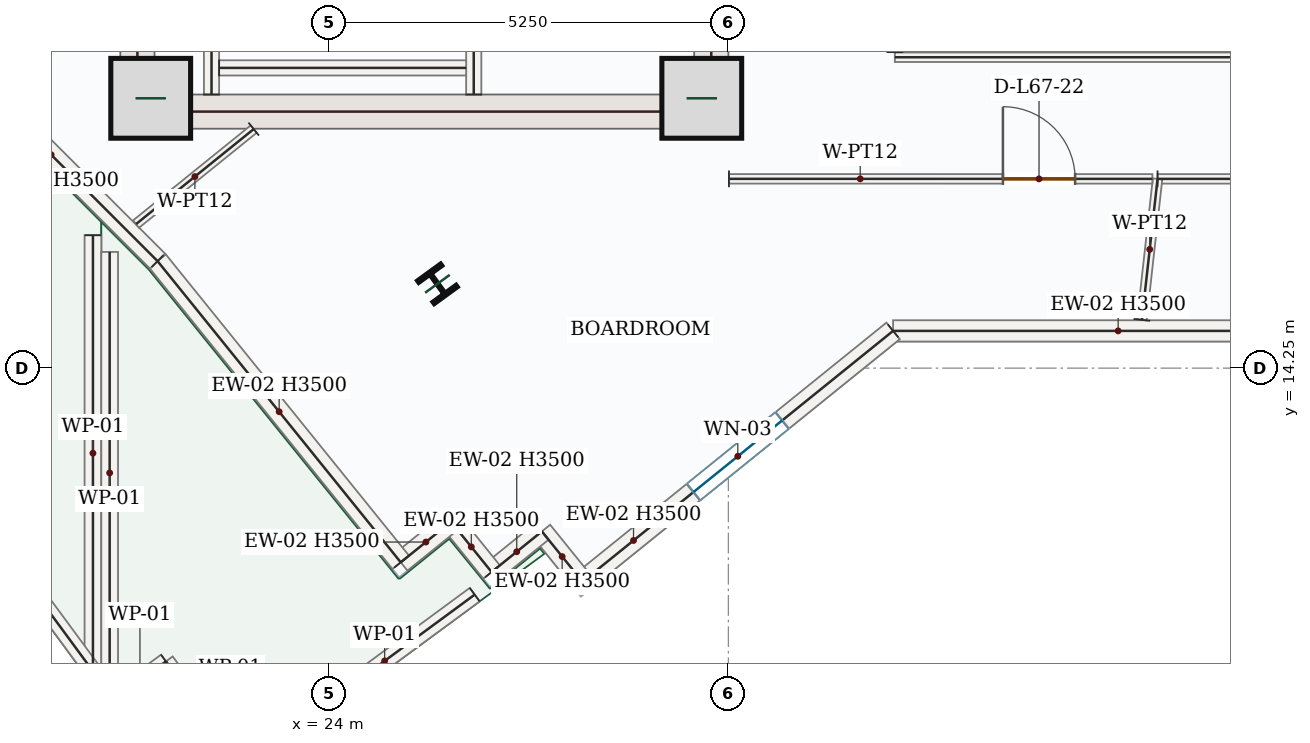
"""IFC4 building model, lengths in metres.
Left out: names, types, materials, properties, quantities, classifications, styles, units other than length and angle.
Written with IfcOpenShell. Run it as: python <this file> out.ifc"""

import sys

from ifc_helpers import new_model, si_unit, direction, frame, frame_2d, origin, origin_2d, place, context, subcontext, project, spatial, rectangle, i_section, extrude, source, transform, mapped, element, fill, save


model = new_model("IFC4")
c1 = context("Model", 3, precision=1e-05, world=origin(), true_north=direction((0.0, 1.0)))
c2 = subcontext(c1, "Body", "Model", "MODEL_VIEW")
j1 = project(units=[si_unit("LENGTHUNIT", "METRE"), si_unit("PLANEANGLEUNIT", "RADIAN")], contexts=[c1])
p1 = place(None, origin())
s1 = spatial("IfcSite", under=j1, at=p1, CompositionType="ELEMENT")
p2 = place(p1, origin())
s2 = spatial("IfcBuilding", under=s1, at=p2, CompositionType="ELEMENT")
p3 = place(p2, frame((0.0, 0.0, 280.35)))
s3 = spatial("IfcBuildingStorey", under=s2, at=p3, CompositionType="ELEMENT", Elevation=280.35)
m1 = source(origin(), c2, "Body", "SweptSolid", [
    extrude(rectangle(XDim=8.55, YDim=0.45, at=frame_2d((4.275, 0.0))), origin(), (0.0, 0.0, 1.0), 3.5),
])
p4 = place(p3, frame((21.475, 17.4, 0.0), z_axis=(0.0, 0.0, 1.0), x_axis=(0.0, 1.0, 0.0)))
e1 = element("IfcWall", 1, at=p4, inside=s3, PredefinedType="SHEAR", context=c2, shape_type="MappedRepresentation", body=[
    mapped(m1, transform((0.0, 0.0, 0.0), x_axis=(1.0, 0.0, 0.0), y_axis=(0.0, 1.0, 0.0), z_axis=(0.0, 0.0, 1.0), scale=1.0)),
])
p5 = place(p3, frame((29.025, 17.4, 0.0), z_axis=(0.0, 0.0, 1.0), x_axis=(0.0, 1.0, 0.0)))
e2 = element("IfcWall", 2, at=p5, inside=s3, PredefinedType="SHEAR", context=c2, shape_type="SweptSolid", body=[
    extrude(rectangle(XDim=8.55, YDim=0.45, at=frame_2d((4.275, 0.0))), origin(), (0.0, 0.0, 1.0), 3.5),
])
p6 = place(p5, frame((6.65, 0.0, 0.0)))
e3 = element("IfcOpeningElement", 3, at=p6, cuts=e2, PredefinedType="OPENING", context=c2, shape_type="SweptSolid", body=[
    extrude(rectangle(XDim=1.1, YDim=2.2, at=frame_2d((0.55, 1.1))), frame((0.0, 0.235, 0.0), z_axis=(0.0, -1.0, 0.0), x_axis=(1.0, 0.0, 0.0)), (0.0, 0.0, 1.0), 0.47),
])
p7 = place(p5, frame((3.15, 0.0, 0.0)))
e4 = element("IfcOpeningElement", 4, at=p7, cuts=e2, PredefinedType="OPENING", context=c2, shape_type="SweptSolid", body=[
    extrude(rectangle(XDim=0.88, YDim=2.1, at=frame_2d((0.44, 1.05))), frame((0.0, 0.235, 0.0), z_axis=(0.0, -1.0, 0.0), x_axis=(1.0, 0.0, 0.0)), (0.0, 0.0, 1.0), 0.47),
])
m2 = source(origin(), c2, "Body", "SweptSolid", [
    extrude(rectangle(XDim=7.1, YDim=0.45, at=frame_2d((3.55, 0.0))), origin(), (0.0, 0.0, 1.0), 3.5),
])
p8 = place(p3, frame((21.7, 17.625, 0.0), z_axis=(0.0, 0.0, 1.0), x_axis=(1.0, 0.0, 0.0)))
e5 = element("IfcWall", 5, at=p8, inside=s3, PredefinedType="SHEAR", context=c2, shape_type="MappedRepresentation", body=[
    mapped(m2, transform((0.0, 0.0, 0.0), x_axis=(1.0, 0.0, 0.0), y_axis=(0.0, 1.0, 0.0), z_axis=(0.0, 0.0, 1.0), scale=1.0)),
])
m3 = source(origin(), c2, "Body", "SweptSolid", [
    extrude(rectangle(XDim=1.05, YDim=1.05, at=origin_2d()), origin(), (0.0, 0.0, 1.0), 3.75),
])
for number, where, z_axis, x_axis in (
    (6, (21.65, 17.8, 0.0), (0.0, 0.0, 1.0), (1.0, 0.0, 0.0)),
    (7, (28.9, 17.8, 0.0), (0.0, 0.0, 1.0), (1.0, 0.0, 0.0)),
):
    element("IfcColumn", number, at=place(p3, frame(where, z_axis=z_axis, x_axis=x_axis)), inside=s3, PredefinedType="COLUMN", context=c2, shape_type="MappedRepresentation", body=[
        mapped(m3, transform((0.0, 0.0, 0.0), x_axis=(1.0, 0.0, 0.0), y_axis=(0.0, 1.0, 0.0), z_axis=(0.0, 0.0, 1.0), scale=1.0)),
    ])
m4 = source(origin(), c2, "Body", "SweptSolid", [
    extrude(i_section(OverallWidth=0.374, OverallDepth=0.372, WebThickness=0.016, FlangeThickness=0.026, FilletRadius=0.018, at=origin_2d()), origin(), (0.0, 0.0, 1.0), 3.75),
])
p9 = place(p3, frame((25.422, 15.359, 0.0), z_axis=(0.0, 0.0, 1.0), x_axis=(0.809016994375, 0.587785252292, 0.0)))
e8 = element("IfcColumn", 8, at=p9, inside=s3, PredefinedType="COLUMN", context=c2, shape_type="MappedRepresentation", body=[
    mapped(m4, transform((0.0, 0.0, 0.0), x_axis=(1.0, 0.0, 0.0), y_axis=(0.0, 1.0, 0.0), z_axis=(0.0, 0.0, 1.0), scale=1.0)),
])
m5 = source(origin(), c2, "Body", "SweptSolid", [
    extrude(rectangle(XDim=5.736, YDim=0.22, at=frame_2d((2.868, 0.0))), origin(), (0.0, 0.0, 1.0), 1.2),
])
p10 = place(p3, frame((20.89, 15.999, 0.0), z_axis=(0.0, 0.0, 1.0), x_axis=(0.0, -1.0, 0.0)))
e9 = element("IfcWall", 9, at=p10, inside=s3, PredefinedType="PARAPET", context=c2, shape_type="MappedRepresentation", body=[
    mapped(m5, transform((0.0, 0.0, 0.0), x_axis=(1.0, 0.0, 0.0), y_axis=(0.0, 1.0, 0.0), z_axis=(0.0, 0.0, 1.0), scale=1.0)),
])
m6 = source(origin(), c2, "Body", "SweptSolid", [
    extrude(rectangle(XDim=9.514, YDim=0.22, at=frame_2d((4.757, 0.0))), origin(), (0.0, 0.0, 1.0), 1.2),
])
p11 = place(p3, frame((20.89, 10.263, 0.0), z_axis=(0.0, 0.0, 1.0), x_axis=(-0.592724500616, 0.805405280818, 0.0)))
e10 = element("IfcWall", 10, at=p11, inside=s3, PredefinedType="PARAPET", context=c2, shape_type="MappedRepresentation", body=[
    mapped(m6, transform((0.0, 0.0, 0.0), x_axis=(1.0, 0.0, 0.0), y_axis=(0.0, 1.0, 0.0), z_axis=(0.0, 0.0, 1.0), scale=1.0)),
])
m7 = source(origin(), c2, "Body", "SweptSolid", [
    extrude(rectangle(XDim=0.85, YDim=0.22, at=frame_2d((0.425, 0.0))), origin(), (0.0, 0.0, 1.0), 1.2),
])
p12 = place(p3, frame((22.354, 9.707, 0.0), z_axis=(0.0, 0.0, 1.0), x_axis=(-0.592807079659, 0.80534450163, 0.0)))
e11 = element("IfcWall", 11, at=p12, inside=s3, PredefinedType="PARAPET", context=c2, shape_type="MappedRepresentation", body=[
    mapped(m7, transform((0.0, 0.0, 0.0), x_axis=(1.0, 0.0, 0.0), y_axis=(0.0, 1.0, 0.0), z_axis=(0.0, 0.0, 1.0), scale=1.0)),
])
m8 = source(origin(), c2, "Body", "SweptSolid", [
    extrude(rectangle(XDim=0.85, YDim=0.22, at=frame_2d((0.425, 0.0))), origin(), (0.0, 0.0, 1.0), 1.2),
])
p13 = place(p3, frame((21.851, 10.392, 0.0), z_axis=(0.0, 0.0, 1.0), x_axis=(-0.805481622783, -0.592620751712, 0.0)))
e12 = element("IfcWall", 12, at=p13, inside=s3, PredefinedType="PARAPET", context=c2, shape_type="MappedRepresentation", body=[
    mapped(m8, transform((0.0, 0.0, 0.0), x_axis=(1.0, 0.0, 0.0), y_axis=(0.0, 1.0, 0.0), z_axis=(0.0, 0.0, 1.0), scale=1.0)),
])
m9 = source(origin(), c2, "Body", "SweptSolid", [
    extrude(rectangle(XDim=5.815, YDim=0.22, at=frame_2d((2.907, 0.0))), origin(), (0.0, 0.0, 1.0), 1.2),
])
p14 = place(p3, frame((21.11, 9.964, 0.0), z_axis=(0.0, 0.0, 1.0), x_axis=(0.0, 1.0, 0.0)))
e13 = element("IfcWall", 13, at=p14, inside=s3, PredefinedType="PARAPET", context=c2, shape_type="MappedRepresentation", body=[
    mapped(m9, transform((0.0, 0.0, 0.0), x_axis=(1.0, 0.0, 0.0), y_axis=(0.0, 1.0, 0.0), z_axis=(0.0, 0.0, 1.0), scale=1.0)),
])
m10 = source(origin(), c2, "Body", "SweptSolid", [
    extrude(rectangle(XDim=2.942, YDim=0.22, at=frame_2d((1.471, 0.0))), origin(), (0.0, 0.0, 1.0), 1.2),
])
p15 = place(p3, frame((25.913, 11.27, 0.0), z_axis=(0.0, 0.0, 1.0), x_axis=(-0.805443619549, -0.592672401692, 0.0)))
e14 = element("IfcWall", 14, at=p15, inside=s3, PredefinedType="PARAPET", context=c2, shape_type="MappedRepresentation", body=[
    mapped(m10, transform((0.0, 0.0, 0.0), x_axis=(1.0, 0.0, 0.0), y_axis=(0.0, 1.0, 0.0), z_axis=(0.0, 0.0, 1.0), scale=1.0)),
])
m11 = source(origin(), c2, "Body", "SweptSolid", [
    extrude(rectangle(XDim=5.922, YDim=0.28, at=frame_2d((2.961, 0.0))), origin(), (0.0, 0.0, 1.0), 3.5),
])
p16 = place(p3, frame((37.339, 14.74, 0.0), z_axis=(0.0, 0.0, 1.0), x_axis=(-1.0, 0.0, 0.0)))
e15 = element("IfcWall", 15, at=p16, inside=s3, PredefinedType="SOLIDWALL", context=c2, shape_type="MappedRepresentation", body=[
    mapped(m11, transform((0.0, 0.0, 0.0), x_axis=(1.0, 0.0, 0.0), y_axis=(0.0, 1.0, 0.0), z_axis=(0.0, 0.0, 1.0), scale=1.0)),
])
p17 = place(p3, frame((31.417, 14.74, 0.0), z_axis=(0.0, 0.0, 1.0), x_axis=(-0.778072238875, -0.628174809342, 0.0)))
e16 = element("IfcWall", 16, at=p17, inside=s3, PredefinedType="SOLIDWALL", context=c2, shape_type="SweptSolid", body=[
    extrude(rectangle(XDim=5.253, YDim=0.28, at=frame_2d((2.626, 0.0))), origin(), (0.0, 0.0, 1.0), 3.5),
])
p18 = place(p17, frame((1.876, 0.0, 0.85)))
e17 = element("IfcOpeningElement", 17, at=p18, cuts=e16, PredefinedType="OPENING", context=c2, shape_type="SweptSolid", body=[
    extrude(rectangle(XDim=1.5, YDim=1.5, at=frame_2d((0.75, 0.75))), frame((0.0, 0.15, 0.0), z_axis=(0.0, -1.0, 0.0), x_axis=(1.0, 0.0, 0.0)), (0.0, 0.0, 1.0), 0.3),
])
m12 = source(origin(), c2, "Body", "SweptSolid", [
    extrude(rectangle(XDim=0.85, YDim=0.28, at=frame_2d((0.425, 0.0))), origin(), (0.0, 0.0, 1.0), 3.5),
])
p19 = place(p3, frame((27.33, 11.44, 0.0), z_axis=(0.0, 0.0, 1.0), x_axis=(-0.628156579423, 0.778086956405, 0.0)))
e18 = element("IfcWall", 18, at=p19, inside=s3, PredefinedType="SOLIDWALL", context=c2, shape_type="MappedRepresentation", body=[
    mapped(m12, transform((0.0, 0.0, 0.0), x_axis=(1.0, 0.0, 0.0), y_axis=(0.0, 1.0, 0.0), z_axis=(0.0, 0.0, 1.0), scale=1.0)),
])
m13 = source(origin(), c2, "Body", "SweptSolid", [
    extrude(rectangle(XDim=0.85, YDim=0.28, at=frame_2d((0.425, 0.0))), origin(), (0.0, 0.0, 1.0), 3.5),
])
p20 = place(p3, frame((26.796, 12.102, 0.0), z_axis=(0.0, 0.0, 1.0), x_axis=(-0.777973585776, -0.628296983786, 0.0)))
e19 = element("IfcWall", 19, at=p20, inside=s3, PredefinedType="SOLIDWALL", context=c2, shape_type="MappedRepresentation", body=[
    mapped(m13, transform((0.0, 0.0, 0.0), x_axis=(1.0, 0.0, 0.0), y_axis=(0.0, 1.0, 0.0), z_axis=(0.0, 0.0, 1.0), scale=1.0)),
])
p21 = place(p3, frame((26.135, 11.568, 0.0), z_axis=(0.0, 0.0, 1.0), x_axis=(-0.628330422687, 0.777946579095, 0.0)))
e20 = element("IfcWall", 20, at=p21, inside=s3, PredefinedType="SOLIDWALL", context=c2, shape_type="MappedRepresentation", body=[
    mapped(m12, transform((0.0, 0.0, 0.0), x_axis=(1.0, 0.0, 0.0), y_axis=(0.0, 1.0, 0.0), z_axis=(0.0, 0.0, 1.0), scale=1.0)),
])
p22 = place(p3, frame((25.601, 12.229, 0.0), z_axis=(0.0, 0.0, 1.0), x_axis=(-0.777973585776, -0.628296983786, 0.0)))
e21 = element("IfcWall", 21, at=p22, inside=s3, PredefinedType="SOLIDWALL", context=c2, shape_type="MappedRepresentation", body=[
    mapped(m13, transform((0.0, 0.0, 0.0), x_axis=(1.0, 0.0, 0.0), y_axis=(0.0, 1.0, 0.0), z_axis=(0.0, 0.0, 1.0), scale=1.0)),
])
m14 = source(origin(), c2, "Body", "SweptSolid", [
    extrude(rectangle(XDim=5.093, YDim=0.28, at=frame_2d((2.546, 0.0))), origin(), (0.0, 0.0, 1.0), 3.5),
])
p23 = place(p3, frame((24.94, 11.695, 0.0), z_axis=(0.0, 0.0, 1.0), x_axis=(-0.628225517447, 0.778031297075, 0.0)))
e22 = element("IfcWall", 22, at=p23, inside=s3, PredefinedType="SOLIDWALL", context=c2, shape_type="MappedRepresentation", body=[
    mapped(m14, transform((0.0, 0.0, 0.0), x_axis=(1.0, 0.0, 0.0), y_axis=(0.0, 1.0, 0.0), z_axis=(0.0, 0.0, 1.0), scale=1.0)),
])
m15 = source(origin(), c2, "Body", "SweptSolid", [
    extrude(rectangle(XDim=3.96, YDim=0.28, at=frame_2d((1.98, 0.0))), origin(), (0.0, 0.0, 1.0), 3.5),
])
p24 = place(p3, frame((21.74, 15.658, 0.0), z_axis=(0.0, 0.0, 1.0), x_axis=(-0.707106781187, 0.707106781187, 0.0)))
e23 = element("IfcWall", 23, at=p24, inside=s3, PredefinedType="SOLIDWALL", context=c2, shape_type="MappedRepresentation", body=[
    mapped(m15, transform((0.0, 0.0, 0.0), x_axis=(1.0, 0.0, 0.0), y_axis=(0.0, 1.0, 0.0), z_axis=(0.0, 0.0, 1.0), scale=1.0)),
])
m16 = source(origin(), c2, "Body", "SweptSolid", [
    extrude(rectangle(XDim=7.87, YDim=0.2, at=frame_2d((3.935, 0.0))), origin(), (0.0, 0.0, 1.0), 3.5),
])
p25 = place(p3, frame((22.45, 17.85, 0.0), z_axis=(0.0, 0.0, 1.0), x_axis=(0.0, 1.0, 0.0)))
e24 = element("IfcWall", 24, at=p25, inside=s3, PredefinedType="SOLIDWALL", context=c2, shape_type="MappedRepresentation", body=[
    mapped(m16, transform((0.0, 0.0, 0.0), x_axis=(1.0, 0.0, 0.0), y_axis=(0.0, 1.0, 0.0), z_axis=(0.0, 0.0, 1.0), scale=1.0)),
])
p26 = place(p3, frame((25.9, 17.85, 0.0), z_axis=(0.0, 0.0, 1.0), x_axis=(0.0, 1.0, 0.0)))
e25 = element("IfcWall", 25, at=p26, inside=s3, PredefinedType="SOLIDWALL", context=c2, shape_type="SweptSolid", body=[
    extrude(rectangle(XDim=8.0, YDim=0.2, at=frame_2d((4.0, 0.0))), origin(), (0.0, 0.0, 1.0), 3.5),
])
p27 = place(p26, frame((6.2, 0.0, 0.0)))
e26 = element("IfcOpeningElement", 26, at=p27, cuts=e25, PredefinedType="OPENING", context=c2, shape_type="SweptSolid", body=[
    extrude(rectangle(XDim=1.0, YDim=2.15, at=frame_2d((0.5, 1.075))), frame((0.0, 0.11, 0.0), z_axis=(0.0, -1.0, 0.0), x_axis=(1.0, 0.0, 0.0)), (0.0, 0.0, 1.0), 0.22),
])
p28 = place(p26, frame((0.6, 0.0, 0.0)))
e27 = element("IfcOpeningElement", 27, at=p28, cuts=e25, PredefinedType="OPENING", context=c2, shape_type="SweptSolid", body=[
    extrude(rectangle(XDim=0.88, YDim=2.1, at=frame_2d((0.44, 1.05))), frame((0.0, 0.11, 0.0), z_axis=(0.0, -1.0, 0.0), x_axis=(1.0, 0.0, 0.0)), (0.0, 0.0, 1.0), 0.22),
])
m17 = source(origin(), c2, "Body", "SweptSolid", [
    extrude(rectangle(XDim=3.25, YDim=0.2, at=frame_2d((1.625, 0.0))), origin(), (0.0, 0.0, 1.0), 3.5),
])
p29 = place(p3, frame((22.55, 18.2, 0.0), z_axis=(0.0, 0.0, 1.0), x_axis=(1.0, 0.0, 0.0)))
e28 = element("IfcWall", 28, at=p29, inside=s3, PredefinedType="SOLIDWALL", context=c2, shape_type="MappedRepresentation", body=[
    mapped(m17, transform((0.0, 0.0, 0.0), x_axis=(1.0, 0.0, 0.0), y_axis=(0.0, 1.0, 0.0), z_axis=(0.0, 0.0, 1.0), scale=1.0)),
])
m18 = source(origin(), c2, "Body", "SweptSolid", [
    extrude(rectangle(XDim=1.989, YDim=0.125, at=frame_2d((0.995, 0.0))), origin(), (0.0, 0.0, 1.0), 3.5),
])
p30 = place(p3, frame((23.005, 17.395, 0.0), z_axis=(0.0, 0.0, 1.0), x_axis=(-0.778058853423, -0.628191388519, 0.0)))
e29 = element("IfcWall", 29, at=p30, inside=s3, PredefinedType="PARTITIONING", context=c2, shape_type="MappedRepresentation", body=[
    mapped(m18, transform((0.0, 0.0, 0.0), x_axis=(1.0, 0.0, 0.0), y_axis=(0.0, 1.0, 0.0), z_axis=(0.0, 0.0, 1.0), scale=1.0)),
])
p31 = place(p3, frame((34.896, 16.74, 0.0), z_axis=(0.0, 0.0, 1.0), x_axis=(1.0, 0.0, 0.0)))
e30 = element("IfcWall", 30, at=p31, inside=s3, PredefinedType="PARTITIONING", context=c2, shape_type="SweptSolid", body=[
    extrude(rectangle(XDim=6.727, YDim=0.125, at=frame_2d((3.364, 0.0))), origin(), (0.0, 0.0, 1.0), 3.5),
])
p32 = place(p31, frame((1.271, 0.0, 0.0)))
e31 = element("IfcOpeningElement", 31, at=p32, cuts=e30, PredefinedType="OPENING", context=c2, shape_type="SweptSolid", body=[
    extrude(rectangle(XDim=0.95, YDim=2.15, at=frame_2d((0.475, 1.075))), frame((0.0, 0.073, 0.0), z_axis=(0.0, -1.0, 0.0), x_axis=(1.0, 0.0, 0.0)), (0.0, 0.0, 1.0), 0.145),
])
m19 = source(origin(), c2, "Body", "SweptSolid", [
    extrude(rectangle(XDim=1.866, YDim=0.125, at=frame_2d((0.933, 0.0))), origin(), (0.0, 0.0, 1.0), 3.5),
])
p33 = place(p3, frame((34.69, 14.885, 0.0), z_axis=(0.0, 0.0, 1.0), x_axis=(0.110661229882, 0.993858185156, 0.0)))
e32 = element("IfcWall", 32, at=p33, inside=s3, PredefinedType="PARTITIONING", context=c2, shape_type="MappedRepresentation", body=[
    mapped(m19, transform((0.0, 0.0, 0.0), x_axis=(1.0, 0.0, 0.0), y_axis=(0.0, 1.0, 0.0), z_axis=(0.0, 0.0, 1.0), scale=1.0)),
])
p34 = place(p3, frame((29.258, 16.74, 0.0), z_axis=(0.0, 0.0, 1.0), x_axis=(0.99999999904, -4.382505e-05, 0.0)))
e33 = element("IfcWall", 33, at=p34, inside=s3, PredefinedType="PARTITIONING", context=c2, shape_type="SweptSolid", body=[
    extrude(rectangle(XDim=5.571, YDim=0.125, at=frame_2d((2.785, 0.0))), origin(), (0.0, 0.0, 1.0), 3.5),
])
p35 = place(p34, frame((3.604, 0.0, 0.0)))
e34 = element("IfcOpeningElement", 34, at=p35, cuts=e33, PredefinedType="OPENING", context=c2, shape_type="SweptSolid", body=[
    extrude(rectangle(XDim=0.95, YDim=2.15, at=frame_2d((0.475, 1.075))), frame((0.0, 0.073, 0.0), z_axis=(0.0, -1.0, 0.0), x_axis=(1.0, 0.0, 0.0)), (0.0, 0.0, 1.0), 0.145),
])
m20 = source(origin(), c2, "Body", "SweptSolid", [
    extrude(rectangle(XDim=9.12, YDim=0.125, at=frame_2d((4.56, 0.0))), origin(), (0.0, 0.0, 1.0), 3.5),
])
p36 = place(p3, frame((40.56, 18.34, 0.0), z_axis=(0.0, 0.0, 1.0), x_axis=(-1.0, 0.0, 0.0)))
e35 = element("IfcWall", 35, at=p36, inside=s3, PredefinedType="PARTITIONING", context=c2, shape_type="MappedRepresentation", body=[
    mapped(m20, transform((0.0, 0.0, 0.0), x_axis=(1.0, 0.0, 0.0), y_axis=(0.0, 1.0, 0.0), z_axis=(0.0, 0.0, 1.0), scale=1.0)),
])
m21 = source(origin(), c2, "Body", "SweptSolid", [
    extrude(rectangle(XDim=1.5, YDim=1.5, at=frame_2d((0.75, 0.75))), frame((0.0, 0.03, 0.0), z_axis=(0.0, -1.0, 0.0), x_axis=(1.0, 0.0, 0.0)), (0.0, 0.0, 1.0), 0.06),
])
p37 = place(p18, origin())
e36 = element("IfcWindow", 36, at=p37, inside=s3, PartitioningType="SINGLE_PANEL", PredefinedType="WINDOW", context=c2, shape_type="MappedRepresentation", body=[
    mapped(m21, transform((0.0, 0.0, 0.0), x_axis=(1.0, 0.0, 0.0), y_axis=(0.0, 1.0, 0.0), z_axis=(0.0, 0.0, 1.0), scale=1.0)),
])
fill(e17, e36)
m22 = source(origin(), c2, "Body", "SweptSolid", [
    extrude(rectangle(XDim=0.95, YDim=2.15, at=frame_2d((0.475, 1.075))), frame((0.0, 0.025, 0.0), z_axis=(0.0, -1.0, 0.0), x_axis=(1.0, 0.0, 0.0)), (0.0, 0.0, 1.0), 0.05),
])
p38 = place(p35, origin())
e37 = element("IfcDoor", 37, at=p38, inside=s3, OperationType="SINGLE_SWING_LEFT", PredefinedType="DOOR", context=c2, shape_type="MappedRepresentation", body=[
    mapped(m22, transform((0.0, 0.0, 0.0), x_axis=(1.0, 0.0, 0.0), y_axis=(0.0, 1.0, 0.0), z_axis=(0.0, 0.0, 1.0), scale=1.0)),
])
fill(e34, e37)
save(model, sys.argv[1])
